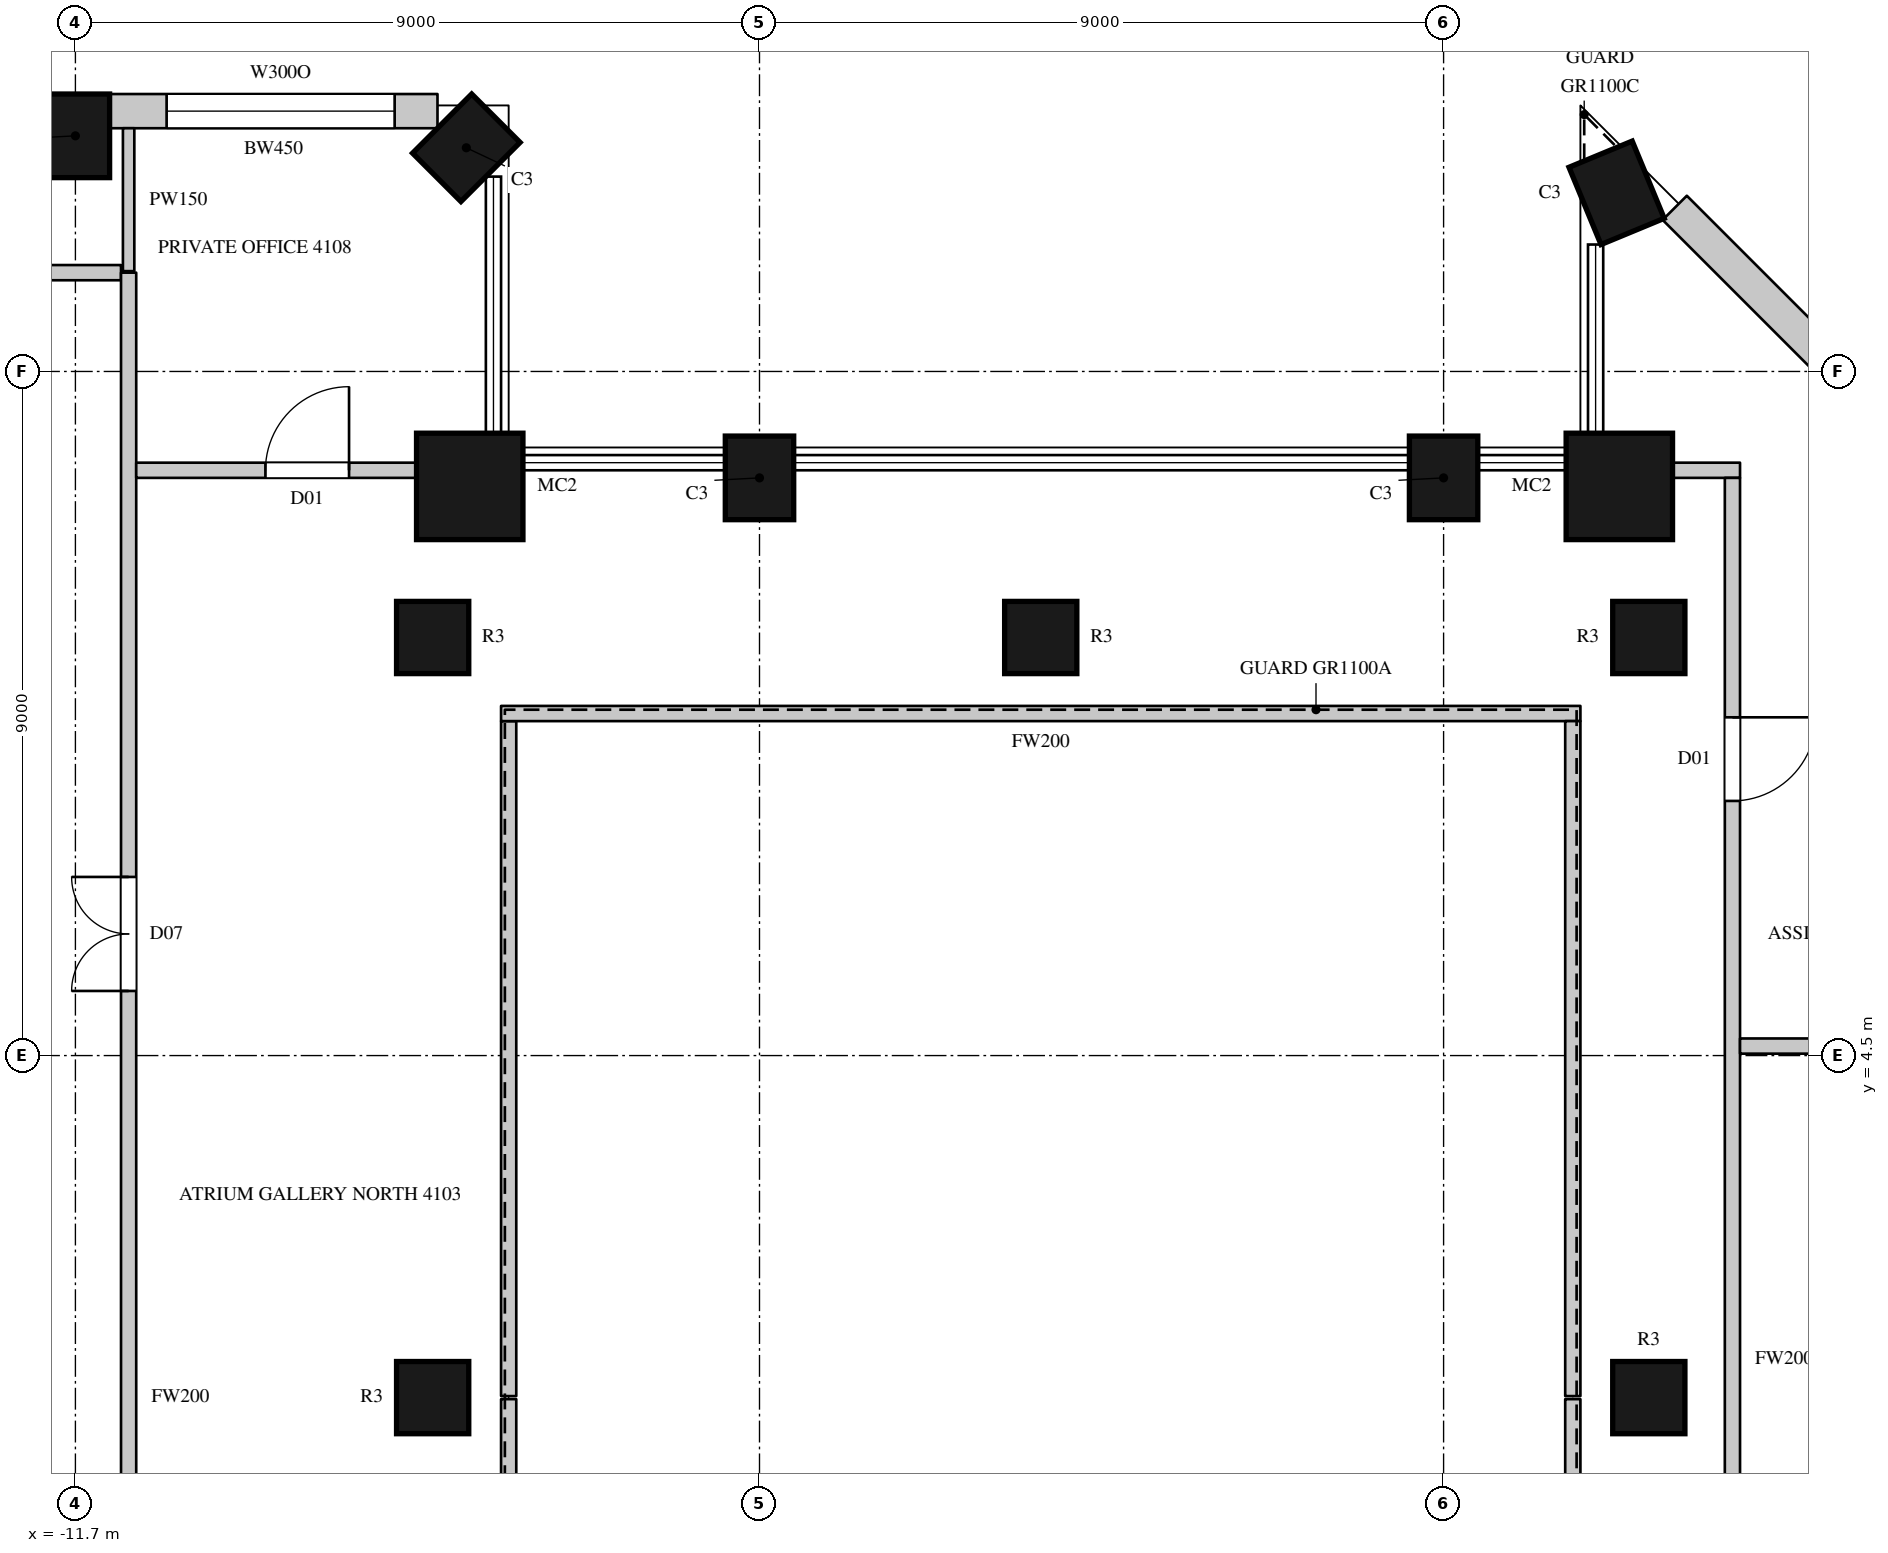
"""IFC4 building model, lengths in metres.
Left out: names, types, materials, properties, quantities, classifications, styles, units other than length and angle.
Written with IfcOpenShell. Run it as: python <this file> out.ifc"""

import sys

from ifc_helpers import new_model, si_unit, direction, frame, frame_2d, origin, origin_2d, place, context, subcontext, project, spatial, rectangle, circle, extrude, element, fill, save


model = new_model("IFC4")
c1 = context("Model", 3, precision=1e-05, world=origin(), true_north=direction((0.0, 1.0)))
c2 = subcontext(c1, "Body", "Model", "MODEL_VIEW")
j1 = project(units=[si_unit("LENGTHUNIT", "METRE"), si_unit("PLANEANGLEUNIT", "RADIAN")], contexts=[c1])
p1 = place(None, origin())
s1 = spatial("IfcSite", under=j1, at=p1, CompositionType="ELEMENT")
p2 = place(p1, origin())
s2 = spatial("IfcBuilding", under=s1, at=p2, CompositionType="ELEMENT")
p3 = place(p2, frame((0.0, 0.0, 189.2)))
s3 = spatial("IfcBuildingStorey", under=s2, at=p3, CompositionType="ELEMENT", Elevation=189.2)
p4 = place(p3, frame((8.576, 15.85, 0.0), z_axis=(0.0, 0.0, 1.0), x_axis=(-0.923879672772, -0.382683093746, 0.0)))
e1 = element("IfcColumn", 1, at=p4, inside=s3, PredefinedType="COLUMN", context=c2, shape_type="SweptSolid", body=[
    extrude(rectangle(XDim=0.9, YDim=1.1, at=origin_2d()), origin(), (0.0, 0.0, 1.0), 4.1),
])
p5 = place(p3, frame((8.612, 11.988, 0.0), z_axis=(0.0, 0.0, 1.0), x_axis=(1.0, 0.0, 0.0)))
e2 = element("IfcColumn", 2, at=p5, inside=s3, PredefinedType="COLUMN", context=c2, shape_type="SweptSolid", body=[
    extrude(circle(Radius=0.7, at=origin_2d()), origin(), (0.0, 0.0, 1.0), 4.1),
])
for number, where, z_axis, x_axis in (
    (3, (6.3, 12.1, 0.0), (0.0, 0.0, 1.0), (-1.0, 0.0, 0.0)),
    (4, (-2.7, 12.1, 0.0), (0.0, 0.0, 1.0), (-1.0, 0.0, 0.0)),
):
    element("IfcColumn", number, at=place(p3, frame(where, z_axis=z_axis, x_axis=x_axis)), inside=s3, PredefinedType="COLUMN", context=c2, shape_type="SweptSolid", body=[
        extrude(rectangle(XDim=0.9, YDim=1.1, at=origin_2d()), origin(), (0.0, 0.0, 1.0), 4.1),
    ])
p6 = place(p3, frame((-6.512, 11.988, 0.0), z_axis=(0.0, 0.0, 1.0), x_axis=(1.0, 0.0, 0.0)))
e5 = element("IfcColumn", 5, at=p6, inside=s3, PredefinedType="COLUMN", context=c2, shape_type="SweptSolid", body=[
    extrude(circle(Radius=0.7, at=origin_2d()), origin(), (0.0, 0.0, 1.0), 4.1),
])
for number, where, z_axis, x_axis in (
    (6, (-6.557, 16.443, 0.0), (0.0, 0.0, 1.0), (-0.707, 0.707, 0.0)),
    (7, (-11.7, 16.6, 0.0), (0.0, 0.0, 1.0), (-1.0, 0.0, 0.0)),
):
    element("IfcColumn", number, at=place(p3, frame(where, z_axis=z_axis, x_axis=x_axis)), inside=s3, PredefinedType="COLUMN", context=c2, shape_type="SweptSolid", body=[
        extrude(rectangle(XDim=0.9, YDim=1.1, at=origin_2d()), origin(), (0.0, 0.0, 1.0), 4.1),
    ])
for number, where, z_axis, x_axis in (
    (8, (-7.0, 0.0, 0.0), (0.0, 0.0, 1.0), (1.0, 0.0, 0.0)),
    (9, (-7.0, 10.0, 0.0), (0.0, 0.0, 1.0), (1.0, 0.0, 0.0)),
    (10, (1.0, 10.0, 0.0), (0.0, 0.0, 1.0), (1.0, 0.0, 0.0)),
    (11, (9.0, 0.0, 0.0), (0.0, 0.0, 1.0), (1.0, 0.0, 0.0)),
    (12, (9.0, 10.0, 0.0), (0.0, 0.0, 1.0), (1.0, 0.0, 0.0)),
):
    element("IfcColumn", number, at=place(p3, frame(where, z_axis=z_axis, x_axis=x_axis)), inside=s3, PredefinedType="COLUMN", context=c2, shape_type="SweptSolid", body=[
        extrude(circle(Radius=0.475, at=origin_2d()), origin(), (0.0, 0.0, 1.0), 4.1),
    ])
p7 = place(p3, frame((13.941, 11.053, 0.0), z_axis=(0.0, 0.0, 1.0), x_axis=(-0.707106781187, 0.707106781187, 0.0)))
e13 = element("IfcWall", 13, at=p7, inside=s3, PredefinedType="SOLIDWALL", context=c2, shape_type="SweptSolid", body=[
    extrude(rectangle(XDim=6.505, YDim=0.45, at=frame_2d((3.252, 0.0))), origin(), (0.0, 0.0, 1.0), 3.8),
])
p8 = place(p7, frame((0.665, 0.0, 0.0)))
e14 = element("IfcOpeningElement", 14, at=p8, cuts=e13, PredefinedType="OPENING", context=c2, shape_type="SweptSolid", body=[
    extrude(rectangle(XDim=1.8, YDim=2.4, at=frame_2d((0.9, 1.2))), frame((0.0, 0.235, 0.0), z_axis=(0.0, -1.0, 0.0), x_axis=(1.0, 0.0, 0.0)), (0.0, 0.0, 1.0), 0.47),
])
p9 = place(p3, frame((-6.936, 16.925, 0.0), z_axis=(0.0, 0.0, 1.0), x_axis=(-1.0, 0.0, 0.0)))
e15 = element("IfcWall", 15, at=p9, inside=s3, PredefinedType="SOLIDWALL", context=c2, shape_type="SweptSolid", body=[
    extrude(rectangle(XDim=4.314, YDim=0.45, at=frame_2d((2.157, 0.0))), origin(), (0.0, 0.0, 1.0), 3.8),
])
p10 = place(p9, frame((0.564, 0.0, 1.05)))
e16 = element("IfcOpeningElement", 16, at=p10, cuts=e15, PredefinedType="OPENING", context=c2, shape_type="SweptSolid", body=[
    extrude(rectangle(XDim=3.0, YDim=2.4, at=frame_2d((1.5, 1.2))), frame((0.0, 0.235, 0.0), z_axis=(0.0, -1.0, 0.0), x_axis=(1.0, 0.0, 0.0)), (0.0, 0.0, 1.0), 0.47),
])
p11 = place(p3, frame((-13.97, 14.8, 0.0), z_axis=(0.0, 0.0, 1.0), x_axis=(1.0, 0.0, 0.0)))
e17 = element("IfcWall", 17, at=p11, inside=s3, PredefinedType="PARTITIONING", context=c2, shape_type="SweptSolid", body=[
    extrude(rectangle(XDim=2.87, YDim=0.2, at=frame_2d((1.435, 0.0))), origin(), (0.0, 0.0, 1.0), 3.8),
])
p12 = place(p3, frame((-11.0, -14.8, 0.0), z_axis=(0.0, 0.0, 1.0), x_axis=(0.0, 1.0, 0.0)))
e18 = element("IfcWall", 18, at=p12, inside=s3, PredefinedType="PARTITIONING", context=c2, shape_type="SweptSolid", body=[
    extrude(rectangle(XDim=29.6, YDim=0.2, at=frame_2d((14.8, 0.0))), origin(), (0.0, 0.0, 1.0), 3.8),
])
p13 = place(p12, frame((20.15, 0.0, 0.0)))
e19 = element("IfcOpeningElement", 19, at=p13, cuts=e18, PredefinedType="OPENING", context=c2, shape_type="SweptSolid", body=[
    extrude(rectangle(XDim=1.5, YDim=2.4, at=frame_2d((0.75, 1.2))), frame((0.0, 0.11, 0.0), z_axis=(0.0, -1.0, 0.0), x_axis=(1.0, 0.0, 0.0)), (0.0, 0.0, 1.0), 0.22),
])
p14 = place(p3, frame((-10.9, 12.2, 0.0), z_axis=(0.0, 0.0, 1.0), x_axis=(1.0, 0.0, 0.0)))
e20 = element("IfcWall", 20, at=p14, inside=s3, PredefinedType="PARTITIONING", context=c2, shape_type="SweptSolid", body=[
    extrude(rectangle(XDim=3.704, YDim=0.2, at=frame_2d((1.852, 0.0))), origin(), (0.0, 0.0, 1.0), 3.8),
])
p15 = place(p14, frame((1.7, 0.0, 0.0)))
e21 = element("IfcOpeningElement", 21, at=p15, cuts=e20, PredefinedType="OPENING", context=c2, shape_type="SweptSolid", body=[
    extrude(rectangle(XDim=1.1, YDim=2.4, at=frame_2d((0.55, 1.2))), frame((0.0, 0.11, 0.0), z_axis=(0.0, -1.0, 0.0), x_axis=(1.0, 0.0, 0.0)), (0.0, 0.0, 1.0), 0.22),
])
for number, where, z_axis, x_axis in (
    (22, (-6.0, -8.9, 0.0), (0.0, 0.0, 1.0), (0.0, 1.0, 0.0)),
    (23, (-6.0, 0.02, 0.0), (0.0, 0.0, 1.0), (0.0, 1.0, 0.0)),
):
    element("IfcWall", number, at=place(p3, frame(where, z_axis=z_axis, x_axis=x_axis)), inside=s3, PredefinedType="PARTITIONING", context=c2, shape_type="SweptSolid", body=[
        extrude(rectangle(XDim=8.88, YDim=0.2, at=frame_2d((4.44, 0.0))), origin(), (0.0, 0.0, 1.0), 3.8),
    ])
p16 = place(p3, frame((-6.1, 9.0, 0.0), z_axis=(0.0, 0.0, 1.0), x_axis=(1.0, 0.0, 0.0)))
e24 = element("IfcWall", 24, at=p16, inside=s3, PredefinedType="PARTITIONING", context=c2, shape_type="SweptSolid", body=[
    extrude(rectangle(XDim=14.2, YDim=0.2, at=frame_2d((7.1, 0.0))), origin(), (0.0, 0.0, 1.0), 3.8),
])
for number, where, z_axis, x_axis in (
    (25, (8.0, -8.9, 0.0), (0.0, 0.0, 1.0), (0.0, 1.0, 0.0)),
    (26, (8.0, 0.02, 0.0), (0.0, 0.0, 1.0), (0.0, 1.0, 0.0)),
):
    element("IfcWall", number, at=place(p3, frame(where, z_axis=z_axis, x_axis=x_axis)), inside=s3, PredefinedType="PARTITIONING", context=c2, shape_type="SweptSolid", body=[
        extrude(rectangle(XDim=8.88, YDim=0.2, at=frame_2d((4.44, 0.0))), origin(), (0.0, 0.0, 1.0), 3.8),
    ])
p17 = place(p3, frame((9.296, 12.2, 0.0), z_axis=(0.0, 0.0, 1.0), x_axis=(1.0, 0.0, 0.0)))
e27 = element("IfcWall", 27, at=p17, inside=s3, PredefinedType="PARTITIONING", context=c2, shape_type="SweptSolid", body=[
    extrude(rectangle(XDim=0.904, YDim=0.2, at=frame_2d((0.452, 0.0))), origin(), (0.0, 0.0, 1.0), 3.8),
])
p18 = place(p3, frame((10.1, -11.1, 0.0), z_axis=(0.0, 0.0, 1.0), x_axis=(0.0, 1.0, 0.0)))
e28 = element("IfcWall", 28, at=p18, inside=s3, PredefinedType="PARTITIONING", context=c2, shape_type="SweptSolid", body=[
    extrude(rectangle(XDim=23.2, YDim=0.2, at=frame_2d((11.6, 0.0))), origin(), (0.0, 0.0, 1.0), 3.8),
])
p19 = place(p18, frame((8.0, 0.0, 0.0)))
e29 = element("IfcOpeningElement", 29, at=p19, cuts=e28, PredefinedType="OPENING", context=c2, shape_type="SweptSolid", body=[
    extrude(rectangle(XDim=1.5, YDim=2.4, at=frame_2d((0.75, 1.2))), frame((0.0, 0.11, 0.0), z_axis=(0.0, -1.0, 0.0), x_axis=(1.0, 0.0, 0.0)), (0.0, 0.0, 1.0), 0.22),
])
p20 = place(p18, frame((18.95, 0.0, 0.0)))
e30 = element("IfcOpeningElement", 30, at=p20, cuts=e28, PredefinedType="OPENING", context=c2, shape_type="SweptSolid", body=[
    extrude(rectangle(XDim=1.1, YDim=2.4, at=frame_2d((0.55, 1.2))), frame((0.0, 0.11, 0.0), z_axis=(0.0, -1.0, 0.0), x_axis=(1.0, 0.0, 0.0)), (0.0, 0.0, 1.0), 0.22),
])
p21 = place(p18, frame((2.7, 0.0, 0.0)))
e31 = element("IfcOpeningElement", 31, at=p21, cuts=e28, PredefinedType="OPENING", context=c2, shape_type="SweptSolid", body=[
    extrude(rectangle(XDim=1.1, YDim=2.4, at=frame_2d((0.55, 1.2))), frame((0.0, 0.11, 0.0), z_axis=(0.0, -1.0, 0.0), x_axis=(1.0, 0.0, 0.0)), (0.0, 0.0, 1.0), 0.22),
])
p22 = place(p3, frame((10.2, 4.625, 0.0), z_axis=(0.0, 0.0, 1.0), x_axis=(1.0, 0.0, 0.0)))
e32 = element("IfcWall", 32, at=p22, inside=s3, PredefinedType="PARTITIONING", context=c2, shape_type="SweptSolid", body=[
    extrude(rectangle(XDim=4.475, YDim=0.2, at=frame_2d((2.238, 0.0))), origin(), (0.0, 0.0, 1.0), 3.8),
])
p23 = place(p3, frame((-11.0, 14.82, 0.0), z_axis=(0.0, 0.0, 1.0), x_axis=(0.0, 1.0, 0.0)))
e33 = element("IfcWall", 33, at=p23, inside=s3, PredefinedType="PARTITIONING", context=c2, shape_type="SweptSolid", body=[
    extrude(rectangle(XDim=1.88, YDim=0.15, at=frame_2d((0.94, 0.0))), origin(), (0.0, 0.0, 1.0), 3.8),
])
p24 = place(p10, origin())
e34 = element("IfcWindow", 34, at=p24, inside=s3, PartitioningType="SINGLE_PANEL", PredefinedType="WINDOW", context=c2, shape_type="SweptSolid", body=[
    extrude(rectangle(XDim=3.0, YDim=2.4, at=frame_2d((1.5, 1.2))), frame((0.0, 0.135, 0.0), z_axis=(0.0, -1.0, 0.0), x_axis=(1.0, 0.0, 0.0)), (0.0, 0.0, 1.0), 0.06),
])
fill(e16, e34)
p25 = place(p13, origin())
e35 = element("IfcDoor", 35, at=p25, inside=s3, OperationType="DOUBLE_DOOR_SINGLE_SWING", PredefinedType="DOOR", context=c2, shape_type="SweptSolid", body=[
    extrude(rectangle(XDim=1.5, YDim=2.4, at=frame_2d((0.75, 1.2))), frame((0.0, 0.025, 0.0), z_axis=(0.0, -1.0, 0.0), x_axis=(1.0, 0.0, 0.0)), (0.0, 0.0, 1.0), 0.05),
])
fill(e19, e35)
p26 = place(p15, origin())
e36 = element("IfcDoor", 36, at=p26, inside=s3, OperationType="SINGLE_SWING_RIGHT", PredefinedType="DOOR", context=c2, shape_type="SweptSolid", body=[
    extrude(rectangle(XDim=1.1, YDim=2.4, at=frame_2d((0.55, 1.2))), frame((0.0, 0.025, 0.0), z_axis=(0.0, -1.0, 0.0), x_axis=(1.0, 0.0, 0.0)), (0.0, 0.0, 1.0), 0.05),
])
fill(e21, e36)
p27 = place(p20, origin())
e37 = element("IfcDoor", 37, at=p27, inside=s3, OperationType="SINGLE_SWING_LEFT", PredefinedType="DOOR", context=c2, shape_type="SweptSolid", body=[
    extrude(rectangle(XDim=1.1, YDim=2.4, at=frame_2d((0.55, 1.2))), frame((0.0, 0.025, 0.0), z_axis=(0.0, -1.0, 0.0), x_axis=(1.0, 0.0, 0.0)), (0.0, 0.0, 1.0), 0.05),
])
fill(e30, e37)
save(model, sys.argv[1])
